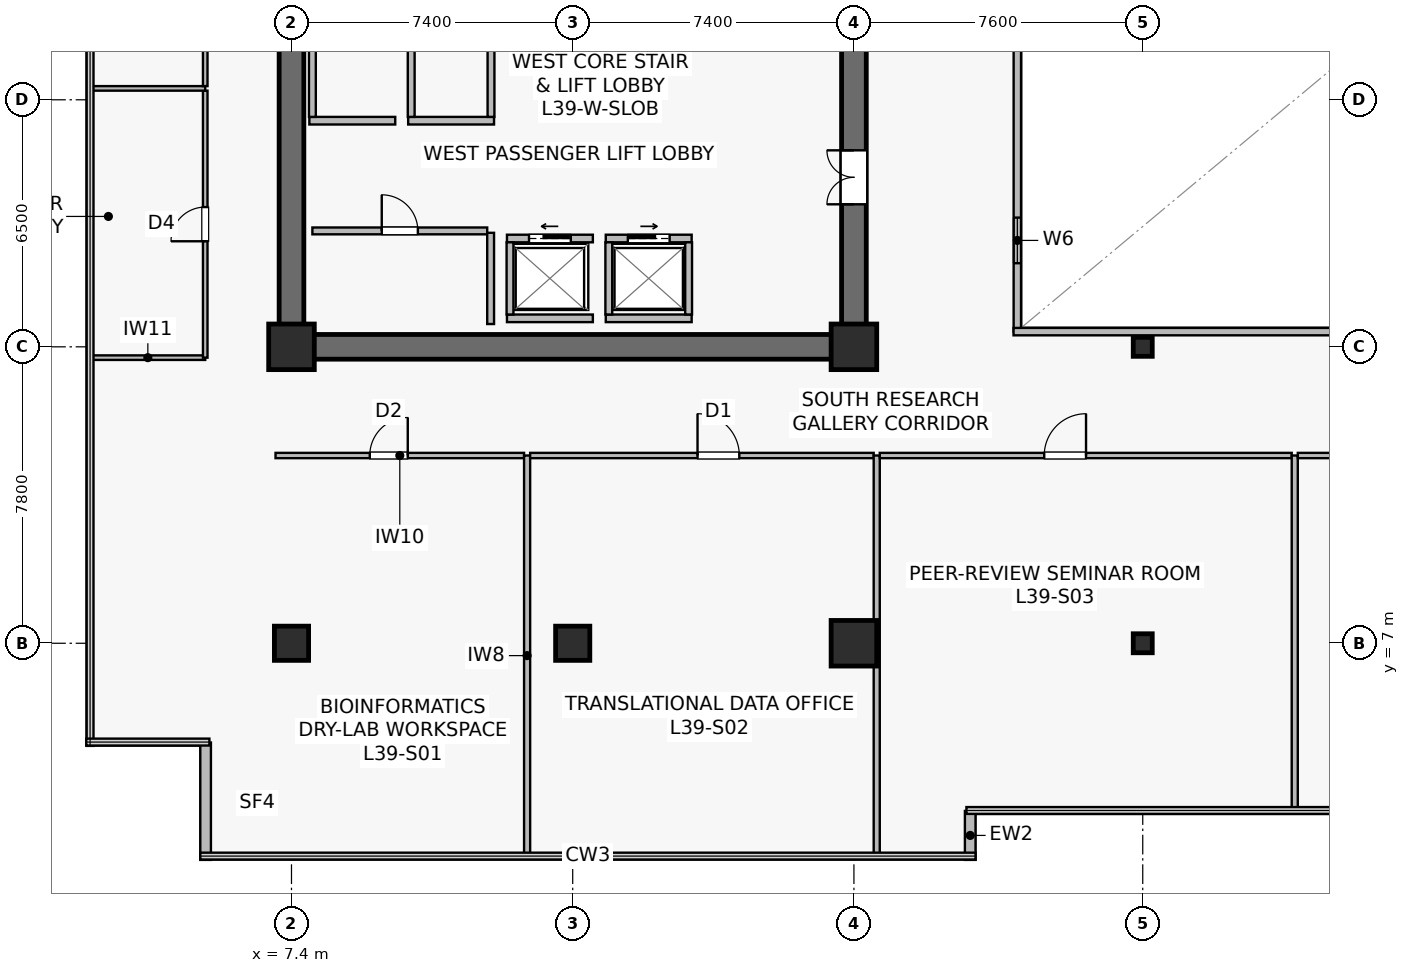
"""IFC4 building model, lengths in metres.
Left out: names, types, materials, properties, quantities, classifications, styles, units other than length and angle.
Written with IfcOpenShell. Run it as: python <this file> out.ifc"""

import sys

from ifc_helpers import new_model, si_unit, direction, frame, frame_2d, origin, origin_2d, place, context, subcontext, project, spatial, rectangle, hollow_rectangle, extrude, source, transform, mapped, element, fill, save


model = new_model("IFC4")
c1 = context("Model", 3, precision=1e-05, world=origin(), true_north=direction((0.0, 1.0)))
c2 = subcontext(c1, "Body", "Model", "MODEL_VIEW")
j1 = project(units=[si_unit("LENGTHUNIT", "METRE"), si_unit("PLANEANGLEUNIT", "RADIAN")], contexts=[c1])
p1 = place(None, origin())
s1 = spatial("IfcSite", under=j1, at=p1, CompositionType="ELEMENT")
p2 = place(p1, origin())
s2 = spatial("IfcBuilding", under=s1, at=p2, CompositionType="ELEMENT")
p3 = place(p2, frame((0.0, 0.0, 162.5)))
s3 = spatial("IfcBuildingStorey", under=s2, at=p3, CompositionType="ELEMENT", Elevation=162.5)
p4 = place(p3, frame((7.075, 14.8, 0.0), z_axis=(0.0, 0.0, 1.0), x_axis=(1.0, 0.0, 0.0)))
e1 = element("IfcWall", 1, at=p4, inside=s3, PredefinedType="SHEAR", context=c2, shape_type="SweptSolid", body=[
    extrude(rectangle(XDim=15.45, YDim=0.65, at=frame_2d((7.725, 0.0))), origin(), (0.0, 0.0, 1.0), 3.79),
])
p5 = place(p3, frame((7.4, 15.125, 0.0), z_axis=(0.0, 0.0, 1.0), x_axis=(0.0, 1.0, 0.0)))
e2 = element("IfcWall", 2, at=p5, inside=s3, PredefinedType="SHEAR", context=c2, shape_type="SweptSolid", body=[
    extrude(rectangle(XDim=18.35, YDim=0.65, at=frame_2d((9.175, 0.0))), origin(), (0.0, 0.0, 1.0), 3.79),
])
p6 = place(p3, frame((22.2, 15.125, 0.0), z_axis=(0.0, 0.0, 1.0), x_axis=(0.0, 1.0, 0.0)))
e3 = element("IfcWall", 3, at=p6, inside=s3, PredefinedType="SHEAR", context=c2, shape_type="SweptSolid", body=[
    extrude(rectangle(XDim=18.35, YDim=0.65, at=frame_2d((9.175, 0.0))), origin(), (0.0, 0.0, 1.0), 3.79),
])
p7 = place(p6, frame((3.425, 0.0, 0.0)))
e4 = element("IfcOpeningElement", 4, at=p7, cuts=e3, PredefinedType="OPENING", context=c2, shape_type="SweptSolid", body=[
    extrude(rectangle(XDim=1.42, YDim=2.2, at=frame_2d((0.71, 1.1))), frame((0.0, 0.335, 0.0), z_axis=(0.0, -1.0, 0.0), x_axis=(1.0, 0.0, 0.0)), (0.0, 0.0, 1.0), 0.67),
])
m1 = source(origin(), c2, "Body", "SweptSolid", [
    extrude(rectangle(XDim=0.9, YDim=0.9, at=origin_2d()), origin(), (0.0, 0.0, 1.0), 4.1),
])
p8 = place(p3, frame((14.8, 7.0, 0.0), z_axis=(0.0, 0.0, 1.0), x_axis=(1.0, 0.0, 0.0)))
e5 = element("IfcColumn", 5, at=p8, inside=s3, PredefinedType="COLUMN", context=c2, shape_type="MappedRepresentation", body=[
    mapped(m1, transform((0.0, 0.0, 0.0), scale=1.0)),
])
m2 = source(origin(), c2, "Body", "SweptSolid", [
    extrude(rectangle(XDim=1.2, YDim=1.2, at=origin_2d()), origin(), (0.0, 0.0, 1.0), 4.1),
])
for number, where, z_axis, x_axis in (
    (6, (22.2, 7.0, 0.0), (0.0, 0.0, 1.0), (1.0, 0.0, 0.0)),
    (7, (7.4, 14.8, 0.0), (0.0, 0.0, 1.0), (1.0, 0.0, 0.0)),
    (8, (22.2, 14.8, 0.0), (0.0, 0.0, 1.0), (1.0, 0.0, 0.0)),
):
    element("IfcColumn", number, at=place(p3, frame(where, z_axis=z_axis, x_axis=x_axis)), inside=s3, PredefinedType="COLUMN", context=c2, shape_type="MappedRepresentation", body=[
        mapped(m2, transform((0.0, 0.0, 0.0), scale=1.0)),
    ])
p9 = place(p3, frame((7.4, 7.0, 0.0), z_axis=(0.0, 0.0, 1.0), x_axis=(1.0, 0.0, 0.0)))
e9 = element("IfcColumn", 9, at=p9, inside=s3, PredefinedType="COLUMN", context=c2, shape_type="MappedRepresentation", body=[
    mapped(m1, transform((0.0, 0.0, 0.0), scale=1.0)),
])
m3 = source(origin(), c2, "Body", "SweptSolid", [
    extrude(hollow_rectangle(XDim=0.5, YDim=0.5, WallThickness=0.022, at=origin_2d()), origin(), (0.0, 0.0, 1.0), 4.1),
])
for number, where, z_axis, x_axis in (
    (10, (29.8, 7.0, 0.0), (0.0, 0.0, 1.0), (1.0, 0.0, 0.0)),
    (11, (29.8, 14.8, 0.0), (0.0, 0.0, 1.0), (1.0, 0.0, 0.0)),
):
    element("IfcColumn", number, at=place(p3, frame(where, z_axis=z_axis, x_axis=x_axis)), inside=s3, PredefinedType="COLUMN", context=c2, shape_type="MappedRepresentation", body=[
        mapped(m3, transform((0.0, 0.0, 0.0), scale=1.0)),
    ])
p10 = place(p3, frame((25.26, 1.3, 0.0), z_axis=(0.0, 0.0, 1.0), x_axis=(0.0, 1.0, 0.0)))
e12 = element("IfcWall", 12, at=p10, inside=s3, PredefinedType="STANDARD", context=c2, shape_type="SweptSolid", body=[
    extrude(rectangle(XDim=1.288, YDim=0.28, at=frame_2d((0.644, 0.0))), origin(), (0.0, 0.0, 1.0), 3.79),
])
p11 = place(p3, frame((5.14, 4.388, 0.0), z_axis=(0.0, 0.0, 1.0), x_axis=(0.0, -1.0, 0.0)))
e13 = element("IfcWall", 13, at=p11, inside=s3, PredefinedType="STANDARD", context=c2, shape_type="SweptSolid", body=[
    extrude(rectangle(XDim=3.088, YDim=0.28, at=frame_2d((1.544, 0.0))), origin(), (0.0, 0.0, 1.0), 3.79),
])
p12 = place(p3, frame((13.07, 17.65, 0.0), z_axis=(0.0, 0.0, 1.0), x_axis=(1.0, 0.0, 0.0)))
e14 = element("IfcWall", 14, at=p12, inside=s3, PredefinedType="SOLIDWALL", context=c2, shape_type="SweptSolid", body=[
    extrude(rectangle(XDim=2.26, YDim=0.2, at=frame_2d((1.13, 0.0))), origin(), (0.0, 0.0, 1.0), 3.187),
])
p13 = place(p12, frame((0.58, 0.0, 0.0)))
e15 = element("IfcOpeningElement", 15, at=p13, cuts=e14, PredefinedType="OPENING", context=c2, shape_type="SweptSolid", body=[
    extrude(rectangle(XDim=1.1, YDim=2.22, at=frame_2d((0.55, 1.11))), frame((0.0, 0.11, 0.0), z_axis=(0.0, -1.0, 0.0), x_axis=(1.0, 0.0, 0.0)), (0.0, 0.0, 1.0), 0.22),
])
p14 = place(p3, frame((13.07, 15.55, 0.0), z_axis=(0.0, 0.0, 1.0), x_axis=(1.0, 0.0, 0.0)))
e16 = element("IfcWall", 16, at=p14, inside=s3, PredefinedType="SOLIDWALL", context=c2, shape_type="SweptSolid", body=[
    extrude(rectangle(XDim=2.26, YDim=0.2, at=frame_2d((1.13, 0.0))), origin(), (0.0, 0.0, 1.0), 3.187),
])
p15 = place(p3, frame((13.15, 15.65, 0.0), z_axis=(0.0, 0.0, 1.0), x_axis=(0.0, 1.0, 0.0)))
e17 = element("IfcWall", 17, at=p15, inside=s3, PredefinedType="SOLIDWALL", context=c2, shape_type="SweptSolid", body=[
    extrude(rectangle(XDim=1.9, YDim=0.18, at=frame_2d((0.95, 0.0))), origin(), (0.0, 0.0, 1.0), 3.79),
])
p16 = place(p3, frame((15.67, 17.65, 0.0), z_axis=(0.0, 0.0, 1.0), x_axis=(1.0, 0.0, 0.0)))
e18 = element("IfcWall", 18, at=p16, inside=s3, PredefinedType="SOLIDWALL", context=c2, shape_type="SweptSolid", body=[
    extrude(rectangle(XDim=2.26, YDim=0.2, at=frame_2d((1.13, 0.0))), origin(), (0.0, 0.0, 1.0), 3.79),
])
p17 = place(p16, frame((0.58, 0.0, 0.0)))
e19 = element("IfcOpeningElement", 19, at=p17, cuts=e18, PredefinedType="OPENING", context=c2, shape_type="SweptSolid", body=[
    extrude(rectangle(XDim=1.1, YDim=2.22, at=frame_2d((0.55, 1.11))), frame((0.0, 0.11, 0.0), z_axis=(0.0, -1.0, 0.0), x_axis=(1.0, 0.0, 0.0)), (0.0, 0.0, 1.0), 0.22),
])
p18 = place(p3, frame((15.67, 15.55, 0.0), z_axis=(0.0, 0.0, 1.0), x_axis=(1.0, 0.0, 0.0)))
e20 = element("IfcWall", 20, at=p18, inside=s3, PredefinedType="SOLIDWALL", context=c2, shape_type="SweptSolid", body=[
    extrude(rectangle(XDim=2.26, YDim=0.2, at=frame_2d((1.13, 0.0))), origin(), (0.0, 0.0, 1.0), 3.79),
])
for number, where, z_axis, x_axis in (
    (21, (15.75, 15.65, 0.0), (0.0, 0.0, 1.0), (0.0, 1.0, 0.0)),
    (22, (17.85, 15.65, 0.0), (0.0, 0.0, 1.0), (0.0, 1.0, 0.0)),
):
    element("IfcWall", number, at=place(p3, frame(where, z_axis=z_axis, x_axis=x_axis)), inside=s3, PredefinedType="SOLIDWALL", context=c2, shape_type="SweptSolid", body=[
        extrude(rectangle(XDim=1.9, YDim=0.18, at=frame_2d((0.95, 0.0))), origin(), (0.0, 0.0, 1.0), 3.79),
    ])
p19 = place(p3, frame((7.87, 20.75, 0.0), z_axis=(0.0, 0.0, 1.0), x_axis=(1.0, 0.0, 0.0)))
e23 = element("IfcWall", 23, at=p19, inside=s3, PredefinedType="SOLIDWALL", context=c2, shape_type="SweptSolid", body=[
    extrude(rectangle(XDim=2.26, YDim=0.2, at=frame_2d((1.13, 0.0))), origin(), (0.0, 0.0, 1.0), 3.79),
])
p20 = place(p3, frame((7.95, 20.85, 0.0), z_axis=(0.0, 0.0, 1.0), x_axis=(0.0, 1.0, 0.0)))
e24 = element("IfcWall", 24, at=p20, inside=s3, PredefinedType="SOLIDWALL", context=c2, shape_type="SweptSolid", body=[
    extrude(rectangle(XDim=1.9, YDim=0.18, at=frame_2d((0.95, 0.0))), origin(), (0.0, 0.0, 1.0), 3.79),
])
p21 = place(p3, frame((10.47, 20.75, 0.0), z_axis=(0.0, 0.0, 1.0), x_axis=(1.0, 0.0, 0.0)))
e25 = element("IfcWall", 25, at=p21, inside=s3, PredefinedType="SOLIDWALL", context=c2, shape_type="SweptSolid", body=[
    extrude(rectangle(XDim=2.26, YDim=0.2, at=frame_2d((1.13, 0.0))), origin(), (0.0, 0.0, 1.0), 3.79),
])
for number, where, z_axis, x_axis in (
    (26, (10.55, 20.85, 0.0), (0.0, 0.0, 1.0), (0.0, 1.0, 0.0)),
    (27, (12.65, 20.85, 0.0), (0.0, 0.0, 1.0), (0.0, 1.0, 0.0)),
):
    element("IfcWall", number, at=place(p3, frame(where, z_axis=z_axis, x_axis=x_axis)), inside=s3, PredefinedType="SOLIDWALL", context=c2, shape_type="SweptSolid", body=[
        extrude(rectangle(XDim=1.9, YDim=0.18, at=frame_2d((0.95, 0.0))), origin(), (0.0, 0.0, 1.0), 3.79),
    ])
p22 = place(p3, frame((7.95, 17.85, 0.0), z_axis=(0.0, 0.0, 1.0), x_axis=(1.0, 0.0, 0.0)))
e28 = element("IfcWall", 28, at=p22, inside=s3, PredefinedType="SOLIDWALL", context=c2, shape_type="SweptSolid", body=[
    extrude(rectangle(XDim=4.6, YDim=0.18, at=frame_2d((2.3, 0.0))), origin(), (0.0, 0.0, 1.0), 3.79),
])
p23 = place(p22, frame((1.825, 0.0, 0.0)))
e29 = element("IfcOpeningElement", 29, at=p23, cuts=e28, PredefinedType="OPENING", context=c2, shape_type="SweptSolid", body=[
    extrude(rectangle(XDim=0.95, YDim=2.15, at=frame_2d((0.475, 1.075))), frame((0.0, 0.1, 0.0), z_axis=(0.0, -1.0, 0.0), x_axis=(1.0, 0.0, 0.0)), (0.0, 0.0, 1.0), 0.2),
])
p24 = place(p3, frame((12.64, 15.4, 0.0), z_axis=(0.0, 0.0, 1.0), x_axis=(0.0, 1.0, 0.0)))
e30 = element("IfcWall", 30, at=p24, inside=s3, PredefinedType="SOLIDWALL", context=c2, shape_type="SweptSolid", body=[
    extrude(rectangle(XDim=2.4, YDim=0.18, at=frame_2d((1.2, 0.0))), origin(), (0.0, 0.0, 1.0), 3.79),
])
p25 = place(p3, frame((26.5, 15.2, 0.0), z_axis=(0.0, 0.0, 1.0), x_axis=(0.0, 1.0, 0.0)))
e31 = element("IfcWall", 31, at=p25, inside=s3, PredefinedType="SOLIDWALL", context=c2, shape_type="SweptSolid", body=[
    extrude(rectangle(XDim=18.2, YDim=0.195, at=frame_2d((9.1, 0.0))), origin(), (0.0, 0.0, 1.0), 3.79),
])
p26 = place(p25, frame((1.8, 0.0, 0.9)))
e32 = element("IfcOpeningElement", 32, at=p26, cuts=e31, PredefinedType="OPENING", context=c2, shape_type="SweptSolid", body=[
    extrude(rectangle(XDim=1.2, YDim=1.35, at=frame_2d((0.6, 0.675))), frame((0.0, 0.107, 0.0), z_axis=(0.0, -1.0, 0.0), x_axis=(1.0, 0.0, 0.0)), (0.0, 0.0, 1.0), 0.215),
])
p27 = place(p25, frame((13.2, 0.0, 0.9)))
e33 = element("IfcOpeningElement", 33, at=p27, cuts=e31, PredefinedType="OPENING", context=c2, shape_type="SweptSolid", body=[
    extrude(rectangle(XDim=1.2, YDim=1.35, at=frame_2d((0.6, 0.675))), frame((0.0, 0.107, 0.0), z_axis=(0.0, -1.0, 0.0), x_axis=(1.0, 0.0, 0.0)), (0.0, 0.0, 1.0), 0.215),
])
p28 = place(p3, frame((26.4, 15.2, 0.0), z_axis=(0.0, 0.0, 1.0), x_axis=(1.0, 0.0, 0.0)))
e34 = element("IfcWall", 34, at=p28, inside=s3, PredefinedType="SOLIDWALL", context=c2, shape_type="SweptSolid", body=[
    extrude(rectangle(XDim=22.0, YDim=0.195, at=frame_2d((11.0, 0.0))), origin(), (0.0, 0.0, 1.0), 3.79),
])
p29 = place(p3, frame((6.98, 11.94, 0.0), z_axis=(0.0, 0.0, 1.0), x_axis=(1.0, 0.0, 0.0)))
e35 = element("IfcWall", 35, at=p29, inside=s3, PredefinedType="PARTITIONING", context=c2, shape_type="SweptSolid", body=[
    extrude(rectangle(XDim=6.54, YDim=0.14, at=frame_2d((3.27, 0.0))), origin(), (0.0, 0.0, 1.0), 3.275),
])
p30 = place(p29, frame((2.479, 0.0, 0.0)))
e36 = element("IfcOpeningElement", 36, at=p30, cuts=e35, PredefinedType="OPENING", context=c2, shape_type="SweptSolid", body=[
    extrude(rectangle(XDim=1.0, YDim=2.15, at=frame_2d((0.5, 1.075))), frame((0.0, 0.08, 0.0), z_axis=(0.0, -1.0, 0.0), x_axis=(1.0, 0.0, 0.0)), (0.0, 0.0, 1.0), 0.16),
])
p31 = place(p3, frame((13.6, 1.41, 0.0), z_axis=(0.0, 0.0, 1.0), x_axis=(0.0, 1.0, 0.0)))
e37 = element("IfcWall", 37, at=p31, inside=s3, PredefinedType="PARTITIONING", context=c2, shape_type="SweptSolid", body=[
    extrude(rectangle(XDim=10.53, YDim=0.16, at=frame_2d((5.265, 0.0))), origin(), (0.0, 0.0, 1.0), 3.075),
])
p32 = place(p3, frame((13.68, 11.94, 0.0), z_axis=(0.0, 0.0, 1.0), x_axis=(1.0, 0.0, 0.0)))
e38 = element("IfcWall", 38, at=p32, inside=s3, PredefinedType="PARTITIONING", context=c2, shape_type="SweptSolid", body=[
    extrude(rectangle(XDim=9.04, YDim=0.14, at=frame_2d((4.52, 0.0))), origin(), (0.0, 0.0, 1.0), 3.187),
])
p33 = place(p32, frame((4.404, 0.0, 0.0)))
e39 = element("IfcOpeningElement", 39, at=p33, cuts=e38, PredefinedType="OPENING", context=c2, shape_type="SweptSolid", body=[
    extrude(rectangle(XDim=1.1, YDim=2.18, at=frame_2d((0.55, 1.09))), frame((0.0, 0.08, 0.0), z_axis=(0.0, -1.0, 0.0), x_axis=(1.0, 0.0, 0.0)), (0.0, 0.0, 1.0), 0.16),
])
p34 = place(p3, frame((22.8, 1.41, 0.0), z_axis=(0.0, 0.0, 1.0), x_axis=(0.0, 1.0, 0.0)))
e40 = element("IfcWall", 40, at=p34, inside=s3, PredefinedType="PARTITIONING", context=c2, shape_type="SweptSolid", body=[
    extrude(rectangle(XDim=10.53, YDim=0.16, at=frame_2d((5.265, 0.0))), origin(), (0.0, 0.0, 1.0), 3.075),
])
p35 = place(p3, frame((22.88, 11.94, 0.0), z_axis=(0.0, 0.0, 1.0), x_axis=(1.0, 0.0, 0.0)))
e41 = element("IfcWall", 41, at=p35, inside=s3, PredefinedType="PARTITIONING", context=c2, shape_type="SweptSolid", body=[
    extrude(rectangle(XDim=10.84, YDim=0.14, at=frame_2d((5.42, 0.0))), origin(), (0.0, 0.0, 1.0), 3.187),
])
p36 = place(p35, frame((4.328, 0.0, 0.0)))
e42 = element("IfcOpeningElement", 42, at=p36, cuts=e41, PredefinedType="OPENING", context=c2, shape_type="SweptSolid", body=[
    extrude(rectangle(XDim=1.1, YDim=2.18, at=frame_2d((0.55, 1.09))), frame((0.0, 0.08, 0.0), z_axis=(0.0, -1.0, 0.0), x_axis=(1.0, 0.0, 0.0)), (0.0, 0.0, 1.0), 0.16),
])
p37 = place(p3, frame((33.8, 2.61, 0.0), z_axis=(0.0, 0.0, 1.0), x_axis=(0.0, 1.0, 0.0)))
e43 = element("IfcWall", 43, at=p37, inside=s3, PredefinedType="PARTITIONING", context=c2, shape_type="SweptSolid", body=[
    extrude(rectangle(XDim=9.33, YDim=0.16, at=frame_2d((4.665, 0.0))), origin(), (0.0, 0.0, 1.0), 3.075),
])
p38 = place(p3, frame((33.88, 11.94, 0.0), z_axis=(0.0, 0.0, 1.0), x_axis=(1.0, 0.0, 0.0)))
e44 = element("IfcWall", 44, at=p38, inside=s3, PredefinedType="PARTITIONING", context=c2, shape_type="SweptSolid", body=[
    extrude(rectangle(XDim=11.44, YDim=0.14, at=frame_2d((5.72, 0.0))), origin(), (0.0, 0.0, 1.0), 3.187),
])
p39 = place(p38, frame((5.748, 0.0, 0.0)))
e45 = element("IfcOpeningElement", 45, at=p39, cuts=e44, PredefinedType="OPENING", context=c2, shape_type="SweptSolid", body=[
    extrude(rectangle(XDim=1.1, YDim=2.18, at=frame_2d((0.55, 1.09))), frame((0.0, 0.08, 0.0), z_axis=(0.0, -1.0, 0.0), x_axis=(1.0, 0.0, 0.0)), (0.0, 0.0, 1.0), 0.16),
])
p40 = place(p3, frame((2.11, 14.515, 0.0), z_axis=(0.0, 0.0, 1.0), x_axis=(1.0, 0.0, 0.0)))
e46 = element("IfcWall", 46, at=p40, inside=s3, PredefinedType="PARTITIONING", context=c2, shape_type="SweptSolid", body=[
    extrude(rectangle(XDim=3.02, YDim=0.12, at=frame_2d((1.51, 0.0))), origin(), (0.0, 0.0, 1.0), 3.79),
])
p41 = place(p3, frame((5.13, 14.515, 0.0), z_axis=(0.0, 0.0, 1.0), x_axis=(0.0, 1.0, 0.0)))
e47 = element("IfcWall", 47, at=p41, inside=s3, PredefinedType="PARTITIONING", context=c2, shape_type="SweptSolid", body=[
    extrude(rectangle(XDim=7.025, YDim=0.12, at=frame_2d((3.513, 0.0))), origin(), (0.0, 0.0, 1.0), 3.79),
])
p42 = place(p41, frame((3.062, 0.0, 0.0)))
e48 = element("IfcOpeningElement", 48, at=p42, cuts=e47, PredefinedType="OPENING", context=c2, shape_type="SweptSolid", body=[
    extrude(rectangle(XDim=0.9, YDim=2.1, at=frame_2d((0.45, 1.05))), frame((0.0, 0.07, 0.0), z_axis=(0.0, -1.0, 0.0), x_axis=(1.0, 0.0, 0.0)), (0.0, 0.0, 1.0), 0.14),
])
p43 = place(p3, frame((2.11, 21.6, 0.0), z_axis=(0.0, 0.0, 1.0), x_axis=(1.0, 0.0, 0.0)))
e49 = element("IfcWall", 49, at=p43, inside=s3, PredefinedType="PARTITIONING", context=c2, shape_type="SweptSolid", body=[
    extrude(rectangle(XDim=3.02, YDim=0.12, at=frame_2d((1.51, 0.0))), origin(), (0.0, 0.0, 1.0), 3.79),
])
p44 = place(p3, frame((5.13, 21.66, 0.0), z_axis=(0.0, 0.0, 1.0), x_axis=(0.0, 1.0, 0.0)))
e50 = element("IfcWall", 50, at=p44, inside=s3, PredefinedType="PARTITIONING", context=c2, shape_type="SweptSolid", body=[
    extrude(rectangle(XDim=6.08, YDim=0.12, at=frame_2d((3.04, 0.0))), origin(), (0.0, 0.0, 1.0), 3.79),
])
p45 = place(p44, frame((2.59, 0.0, 0.0)))
e51 = element("IfcOpeningElement", 51, at=p45, cuts=e50, PredefinedType="OPENING", context=c2, shape_type="SweptSolid", body=[
    extrude(rectangle(XDim=0.9, YDim=2.1, at=frame_2d((0.45, 1.05))), frame((0.0, 0.07, 0.0), z_axis=(0.0, -1.0, 0.0), x_axis=(1.0, 0.0, 0.0)), (0.0, 0.0, 1.0), 0.14),
])
m4 = source(origin(), c2, "Body", "SweptSolid", [
    extrude(rectangle(XDim=1.2, YDim=1.35, at=frame_2d((0.6, 0.675))), frame((0.0, 0.03, 0.0), z_axis=(0.0, -1.0, 0.0), x_axis=(1.0, 0.0, 0.0)), (0.0, 0.0, 1.0), 0.06),
])
p46 = place(p26, origin())
e52 = element("IfcWindow", 52, at=p46, inside=s3, PartitioningType="SINGLE_PANEL", PredefinedType="WINDOW", context=c2, shape_type="MappedRepresentation", body=[
    mapped(m4, transform((0.0, 0.0, 0.0), scale=1.0)),
])
fill(e32, e52)
m5 = source(origin(), c2, "Body", "SweptSolid", [
    extrude(rectangle(XDim=1.1, YDim=2.22, at=frame_2d((0.55, 1.11))), frame((0.0, 0.025, 0.0), z_axis=(0.0, -1.0, 0.0), x_axis=(1.0, 0.0, 0.0)), (0.0, 0.0, 1.0), 0.05),
])
p47 = place(p13, origin())
e53 = element("IfcDoor", 53, at=p47, inside=s3, OperationType="SLIDING_TO_LEFT", PredefinedType="USERDEFINED", context=c2, shape_type="MappedRepresentation", body=[
    mapped(m5, transform((0.0, 0.0, 0.0), scale=1.0)),
])
fill(e15, e53)
p48 = place(p17, origin())
e54 = element("IfcDoor", 54, at=p48, inside=s3, OperationType="SLIDING_TO_RIGHT", PredefinedType="USERDEFINED", context=c2, shape_type="MappedRepresentation", body=[
    mapped(m5, transform((0.0, 0.0, 0.0), scale=1.0)),
])
fill(e19, e54)
m6 = source(origin(), c2, "Body", "SweptSolid", [
    extrude(rectangle(XDim=0.95, YDim=2.15, at=frame_2d((0.475, 1.075))), frame((0.0, 0.025, 0.0), z_axis=(0.0, -1.0, 0.0), x_axis=(1.0, 0.0, 0.0)), (0.0, 0.0, 1.0), 0.05),
])
p49 = place(p23, origin())
e55 = element("IfcDoor", 55, at=p49, inside=s3, OperationType="SINGLE_SWING_LEFT", PredefinedType="DOOR", context=c2, shape_type="MappedRepresentation", body=[
    mapped(m6, transform((0.0, 0.0, 0.0), scale=1.0)),
])
fill(e29, e55)
m7 = source(origin(), c2, "Body", "SweptSolid", [
    extrude(rectangle(XDim=1.42, YDim=2.2, at=frame_2d((0.71, 1.1))), frame((0.0, 0.025, 0.0), z_axis=(0.0, -1.0, 0.0), x_axis=(1.0, 0.0, 0.0)), (0.0, 0.0, 1.0), 0.05),
])
p50 = place(p7, origin())
e56 = element("IfcDoor", 56, at=p50, inside=s3, OperationType="DOUBLE_DOOR_SINGLE_SWING", PredefinedType="DOOR", context=c2, shape_type="MappedRepresentation", body=[
    mapped(m7, transform((0.0, 0.0, 0.0), scale=1.0)),
])
fill(e4, e56)
m8 = source(origin(), c2, "Body", "SweptSolid", [
    extrude(rectangle(XDim=1.0, YDim=2.15, at=frame_2d((0.5, 1.075))), frame((0.0, 0.025, 0.0), z_axis=(0.0, -1.0, 0.0), x_axis=(1.0, 0.0, 0.0)), (0.0, 0.0, 1.0), 0.05),
])
p51 = place(p30, origin())
e57 = element("IfcDoor", 57, at=p51, inside=s3, OperationType="SINGLE_SWING_RIGHT", PredefinedType="DOOR", context=c2, shape_type="MappedRepresentation", body=[
    mapped(m8, transform((0.0, 0.0, 0.0), scale=1.0)),
])
fill(e36, e57)
m9 = source(origin(), c2, "Body", "SweptSolid", [
    extrude(rectangle(XDim=1.1, YDim=2.18, at=frame_2d((0.55, 1.09))), frame((0.0, 0.025, 0.0), z_axis=(0.0, -1.0, 0.0), x_axis=(1.0, 0.0, 0.0)), (0.0, 0.0, 1.0), 0.05),
])
p52 = place(p33, origin())
e58 = element("IfcDoor", 58, at=p52, inside=s3, OperationType="SINGLE_SWING_LEFT", PredefinedType="DOOR", context=c2, shape_type="MappedRepresentation", body=[
    mapped(m9, transform((0.0, 0.0, 0.0), scale=1.0)),
])
fill(e39, e58)
p53 = place(p36, origin())
e59 = element("IfcDoor", 59, at=p53, inside=s3, OperationType="SINGLE_SWING_RIGHT", PredefinedType="DOOR", context=c2, shape_type="MappedRepresentation", body=[
    mapped(m9, transform((0.0, 0.0, 0.0), scale=1.0)),
])
fill(e42, e59)
m10 = source(origin(), c2, "Body", "SweptSolid", [
    extrude(rectangle(XDim=0.9, YDim=2.1, at=frame_2d((0.45, 1.05))), frame((0.0, 0.025, 0.0), z_axis=(0.0, -1.0, 0.0), x_axis=(1.0, 0.0, 0.0)), (0.0, 0.0, 1.0), 0.05),
])
p54 = place(p42, origin())
e60 = element("IfcDoor", 60, at=p54, inside=s3, OperationType="SINGLE_SWING_LEFT", PredefinedType="DOOR", context=c2, shape_type="MappedRepresentation", body=[
    mapped(m10, transform((0.0, 0.0, 0.0), scale=1.0)),
])
fill(e48, e60)
save(model, sys.argv[1])
